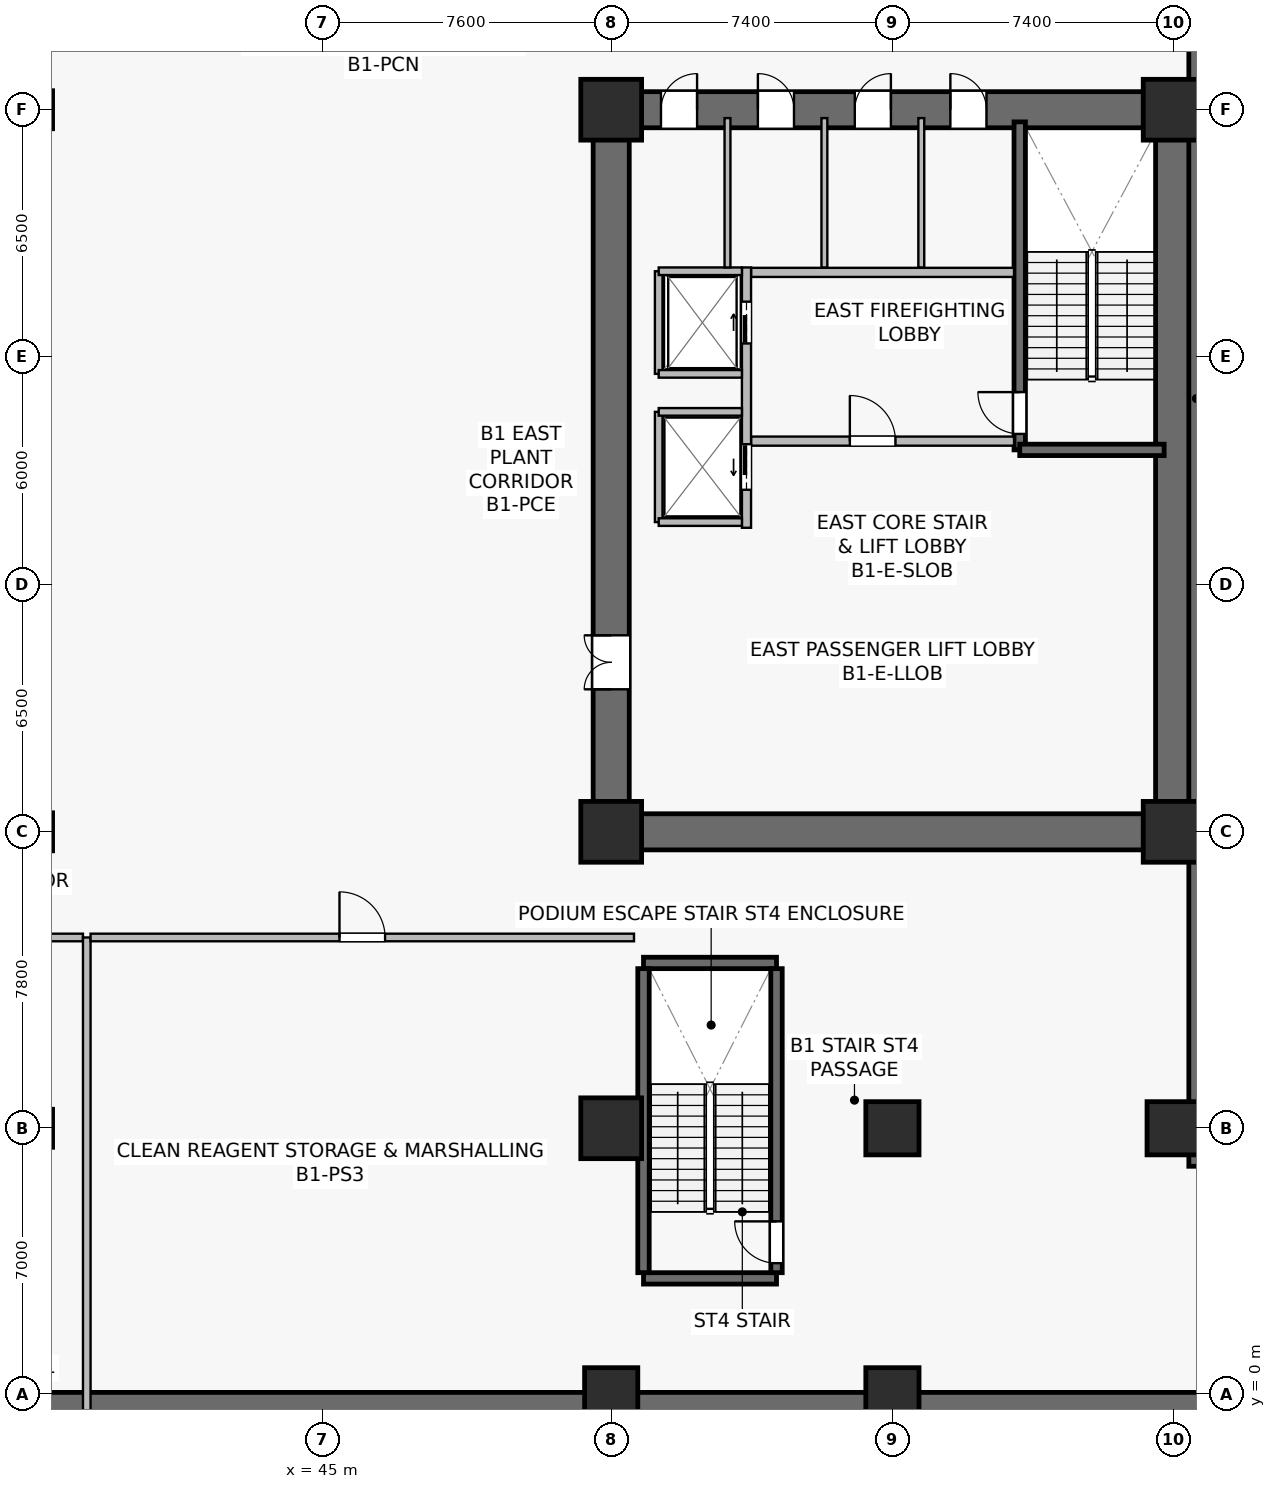
"""IFC4 building model, lengths in metres.
Left out: names, types, materials, properties, quantities, classifications, styles, units other than length and angle.
Written with IfcOpenShell. Run it as: python <this file> out.ifc"""

import sys

from ifc_helpers import new_model, si_unit, direction, frame, frame_2d, origin, origin_2d, place, context, subcontext, project, spatial, rectangle, extrude, source, transform, mapped, element, fill, save


model = new_model("IFC4")
c1 = context("Model", 3, precision=1e-05, world=origin(), true_north=direction((0.0, 1.0)))
c2 = subcontext(c1, "Body", "Model", "MODEL_VIEW")
j1 = project(units=[si_unit("LENGTHUNIT", "METRE"), si_unit("PLANEANGLEUNIT", "RADIAN")], contexts=[c1])
p1 = place(None, origin())
s1 = spatial("IfcSite", under=j1, at=p1, CompositionType="ELEMENT")
p2 = place(p1, origin())
s2 = spatial("IfcBuilding", under=s1, at=p2, CompositionType="ELEMENT")
p3 = place(p2, frame((0.0, 0.0, -4.8)))
s3 = spatial("IfcBuildingStorey", under=s2, at=p3, CompositionType="ELEMENT", Elevation=-4.8)
p4 = place(p3, frame((52.125, 14.8, 0.0), z_axis=(0.0, 0.0, 1.0), x_axis=(1.0, 0.0, 0.0)))
e1 = element("IfcWall", 1, at=p4, inside=s3, PredefinedType="SHEAR", context=c2, shape_type="SweptSolid", body=[
    extrude(rectangle(XDim=15.75, YDim=0.95, at=frame_2d((7.875, 0.0))), origin(), (0.0, 0.0, 1.0), 4.45),
])
p5 = place(p3, frame((52.125, 33.8, 0.0), z_axis=(0.0, 0.0, 1.0), x_axis=(1.0, 0.0, 0.0)))
e2 = element("IfcWall", 2, at=p5, inside=s3, PredefinedType="SHEAR", context=c2, shape_type="SweptSolid", body=[
    extrude(rectangle(XDim=15.75, YDim=0.95, at=frame_2d((7.875, 0.0))), origin(), (0.0, 0.0, 1.0), 4.45),
])
p6 = place(p5, frame((9.4, 0.0, 0.0)))
e3 = element("IfcOpeningElement", 3, at=p6, cuts=e2, PredefinedType="OPENING", context=c2, shape_type="SweptSolid", body=[
    extrude(rectangle(XDim=0.95, YDim=2.15, at=frame_2d((0.475, 1.075))), frame((0.0, 0.485, 0.0), z_axis=(0.0, -1.0, 0.0), x_axis=(1.0, 0.0, 0.0)), (0.0, 0.0, 1.0), 0.97),
])
p7 = place(p5, frame((6.885, 0.0, 0.0)))
e4 = element("IfcOpeningElement", 4, at=p7, cuts=e2, PredefinedType="OPENING", context=c2, shape_type="SweptSolid", body=[
    extrude(rectangle(XDim=0.95, YDim=2.15, at=frame_2d((0.475, 1.075))), frame((0.0, 0.485, 0.0), z_axis=(0.0, -1.0, 0.0), x_axis=(1.0, 0.0, 0.0)), (0.0, 0.0, 1.0), 0.97),
])
p8 = place(p5, frame((4.335, 0.0, 0.0)))
e5 = element("IfcOpeningElement", 5, at=p8, cuts=e2, PredefinedType="OPENING", context=c2, shape_type="SweptSolid", body=[
    extrude(rectangle(XDim=0.95, YDim=2.15, at=frame_2d((0.475, 1.075))), frame((0.0, 0.485, 0.0), z_axis=(0.0, -1.0, 0.0), x_axis=(1.0, 0.0, 0.0)), (0.0, 0.0, 1.0), 0.97),
])
p9 = place(p5, frame((1.785, 0.0, 0.0)))
e6 = element("IfcOpeningElement", 6, at=p9, cuts=e2, PredefinedType="OPENING", context=c2, shape_type="SweptSolid", body=[
    extrude(rectangle(XDim=0.95, YDim=2.15, at=frame_2d((0.475, 1.075))), frame((0.0, 0.485, 0.0), z_axis=(0.0, -1.0, 0.0), x_axis=(1.0, 0.0, 0.0)), (0.0, 0.0, 1.0), 0.97),
])
p10 = place(p3, frame((52.6, 15.275, 0.0), z_axis=(0.0, 0.0, 1.0), x_axis=(0.0, 1.0, 0.0)))
e7 = element("IfcWall", 7, at=p10, inside=s3, PredefinedType="SHEAR", context=c2, shape_type="SweptSolid", body=[
    extrude(rectangle(XDim=18.05, YDim=0.95, at=frame_2d((9.025, 0.0))), origin(), (0.0, 0.0, 1.0), 4.45),
])
p11 = place(p10, frame((3.275, 0.0, 0.0)))
e8 = element("IfcOpeningElement", 8, at=p11, cuts=e7, PredefinedType="OPENING", context=c2, shape_type="SweptSolid", body=[
    extrude(rectangle(XDim=1.42, YDim=2.2, at=frame_2d((0.71, 1.1))), frame((0.0, 0.485, 0.0), z_axis=(0.0, -1.0, 0.0), x_axis=(1.0, 0.0, 0.0)), (0.0, 0.0, 1.0), 0.97),
])
p12 = place(p3, frame((67.4, 15.275, 0.0), z_axis=(0.0, 0.0, 1.0), x_axis=(0.0, 1.0, 0.0)))
e9 = element("IfcWall", 9, at=p12, inside=s3, PredefinedType="SHEAR", context=c2, shape_type="SweptSolid", body=[
    extrude(rectangle(XDim=18.05, YDim=0.95, at=frame_2d((9.025, 0.0))), origin(), (0.0, 0.0, 1.0), 4.45),
])
p13 = place(p3, frame((63.35, 24.85, 0.0), z_axis=(0.0, 0.0, 1.0), x_axis=(0.0, 1.0, 0.0)))
e10 = element("IfcWall", 10, at=p13, inside=s3, PredefinedType="SHEAR", context=c2, shape_type="SweptSolid", body=[
    extrude(rectangle(XDim=8.63, YDim=0.3, at=frame_2d((4.315, 0.0))), origin(), (0.0, 0.0, 1.0), 4.45),
])
p14 = place(p13, frame((0.42, 0.0, 0.0)))
e11 = element("IfcOpeningElement", 11, at=p14, cuts=e10, PredefinedType="OPENING", context=c2, shape_type="SweptSolid", body=[
    extrude(rectangle(XDim=1.1, YDim=2.15, at=frame_2d((0.55, 1.075))), frame((0.0, 0.16, 0.0), z_axis=(0.0, -1.0, 0.0), x_axis=(1.0, 0.0, 0.0)), (0.0, 0.0, 1.0), 0.32),
])
p15 = place(p3, frame((63.35, 24.85, 0.0), z_axis=(0.0, 0.0, 1.0), x_axis=(1.0, 0.0, 0.0)))
e12 = element("IfcWall", 12, at=p15, inside=s3, PredefinedType="SHEAR", context=c2, shape_type="SweptSolid", body=[
    extrude(rectangle(XDim=3.8, YDim=0.3, at=frame_2d((1.9, 0.0))), origin(), (0.0, 0.0, 1.0), 4.45),
])
for number, where, z_axis, x_axis in (
    (13, (53.45, 3.05, 0.0), (0.0, 0.0, 1.0), (1.0, 0.0, 0.0)),
    (14, (53.45, 11.35, 0.0), (0.0, 0.0, 1.0), (1.0, 0.0, 0.0)),
):
    element("IfcWall", number, at=place(p3, frame(where, z_axis=z_axis, x_axis=x_axis)), inside=s3, PredefinedType="SHEAR", context=c2, shape_type="SweptSolid", body=[
        extrude(rectangle(XDim=3.5, YDim=0.3, at=frame_2d((1.75, 0.0))), origin(), (0.0, 0.0, 1.0), 4.45),
    ])
p16 = place(p3, frame((53.45, 3.2, 0.0), z_axis=(0.0, 0.0, 1.0), x_axis=(0.0, 1.0, 0.0)))
e15 = element("IfcWall", 15, at=p16, inside=s3, PredefinedType="SHEAR", context=c2, shape_type="SweptSolid", body=[
    extrude(rectangle(XDim=8.0, YDim=0.3, at=frame_2d((4.0, 0.0))), origin(), (0.0, 0.0, 1.0), 4.45),
])
p17 = place(p3, frame((56.95, 3.2, 0.0), z_axis=(0.0, 0.0, 1.0), x_axis=(0.0, 1.0, 0.0)))
e16 = element("IfcWall", 16, at=p17, inside=s3, PredefinedType="SHEAR", context=c2, shape_type="SweptSolid", body=[
    extrude(rectangle(XDim=8.0, YDim=0.3, at=frame_2d((4.0, 0.0))), origin(), (0.0, 0.0, 1.0), 4.45),
])
p18 = place(p17, frame((0.25, 0.0, 0.0)))
e17 = element("IfcOpeningElement", 17, at=p18, cuts=e16, PredefinedType="OPENING", context=c2, shape_type="SweptSolid", body=[
    extrude(rectangle(XDim=1.1, YDim=2.15, at=frame_2d((0.55, 1.075))), frame((0.0, 0.16, 0.0), z_axis=(0.0, -1.0, 0.0), x_axis=(1.0, 0.0, 0.0)), (0.0, 0.0, 1.0), 0.32),
])
p19 = place(p3, frame((-1.0, -0.375, 0.0), z_axis=(0.0, 0.0, 1.0), x_axis=(1.0, 0.0, 0.0)))
e18 = element("IfcWall", 18, at=p19, inside=s3, PredefinedType="SOLIDWALL", context=c2, shape_type="SweptSolid", body=[
    extrude(rectangle(XDim=76.8, YDim=0.85, at=frame_2d((38.4, 0.0))), origin(), (0.0, 0.0, 1.0), 4.45),
])
p20 = place(p3, frame((68.0, 6.0, 0.0), z_axis=(0.0, 0.0, 1.0), x_axis=(0.0, 1.0, 0.0)))
e19 = element("IfcWall", 19, at=p20, inside=s3, PredefinedType="SHEAR", context=c2, shape_type="SweptSolid", body=[
    extrude(rectangle(XDim=40.4, YDim=0.4, at=frame_2d((20.2, 0.0))), origin(), (0.0, 0.0, 1.0), 4.45),
])
m1 = source(origin(), c2, "Body", "SweptSolid", [
    extrude(rectangle(XDim=1.6, YDim=1.6, at=origin_2d()), origin(), (0.0, 0.0, 1.0), 4.8),
])
p21 = place(p3, frame((52.6, 7.0, 0.0), z_axis=(0.0, 0.0, 1.0), x_axis=(1.0, 0.0, 0.0)))
e20 = element("IfcColumn", 20, at=p21, inside=s3, PredefinedType="COLUMN", context=c2, shape_type="MappedRepresentation", body=[
    mapped(m1, transform((0.0, 0.0, 0.0), scale=1.0)),
])
m2 = source(origin(), c2, "Body", "SweptSolid", [
    extrude(rectangle(XDim=1.4, YDim=1.4, at=origin_2d()), origin(), (0.0, 0.0, 1.0), 4.8),
])
p22 = place(p3, frame((60.0, 7.0, 0.0), z_axis=(0.0, 0.0, 1.0), x_axis=(1.0, 0.0, 0.0)))
e21 = element("IfcColumn", 21, at=p22, inside=s3, PredefinedType="COLUMN", context=c2, shape_type="MappedRepresentation", body=[
    mapped(m2, transform((0.0, 0.0, 0.0), scale=1.0)),
])
for number, where, z_axis, x_axis in (
    (22, (52.6, 14.8, 0.0), (0.0, 0.0, 1.0), (1.0, 0.0, 0.0)),
    (23, (67.4, 14.8, 0.0), (0.0, 0.0, 1.0), (1.0, 0.0, 0.0)),
    (24, (52.6, 33.8, 0.0), (0.0, 0.0, 1.0), (1.0, 0.0, 0.0)),
    (25, (67.4, 33.8, 0.0), (0.0, 0.0, 1.0), (1.0, 0.0, 0.0)),
):
    element("IfcColumn", number, at=place(p3, frame(where, z_axis=z_axis, x_axis=x_axis)), inside=s3, PredefinedType="COLUMN", context=c2, shape_type="MappedRepresentation", body=[
        mapped(m1, transform((0.0, 0.0, 0.0), scale=1.0)),
    ])
for number, where, z_axis, x_axis in (
    (26, (67.4, 7.0, 0.0), (0.0, 0.0, 1.0), (1.0, 0.0, 0.0)),
    (27, (52.6, 0.0, 0.0), (0.0, 0.0, 1.0), (1.0, 0.0, 0.0)),
    (28, (60.0, 0.0, 0.0), (0.0, 0.0, 1.0), (1.0, 0.0, 0.0)),
):
    element("IfcColumn", number, at=place(p3, frame(where, z_axis=z_axis, x_axis=x_axis)), inside=s3, PredefinedType="COLUMN", context=c2, shape_type="MappedRepresentation", body=[
        mapped(m2, transform((0.0, 0.0, 0.0), scale=1.0)),
    ])
p23 = place(p3, frame((56.28, 25.08, 0.0), z_axis=(0.0, 0.0, 1.0), x_axis=(1.0, 0.0, 0.0)))
e29 = element("IfcWall", 29, at=p23, inside=s3, PredefinedType="SOLIDWALL", context=c2, shape_type="SweptSolid", body=[
    extrude(rectangle(XDim=6.92, YDim=0.24, at=frame_2d((3.46, 0.0))), origin(), (0.0, 0.0, 1.0), 3.685),
])
p24 = place(p23, frame((2.6, 0.0, 0.0)))
e30 = element("IfcOpeningElement", 30, at=p24, cuts=e29, PredefinedType="OPENING", context=c2, shape_type="SweptSolid", body=[
    extrude(rectangle(XDim=1.2, YDim=2.16, at=frame_2d((0.6, 1.08))), frame((0.0, 0.13, 0.0), z_axis=(0.0, -1.0, 0.0), x_axis=(1.0, 0.0, 0.0)), (0.0, 0.0, 1.0), 0.26),
])
p25 = place(p3, frame((56.28, 29.52, 0.0), z_axis=(0.0, 0.0, 1.0), x_axis=(1.0, 0.0, 0.0)))
e31 = element("IfcWall", 31, at=p25, inside=s3, PredefinedType="SOLIDWALL", context=c2, shape_type="SweptSolid", body=[
    extrude(rectangle(XDim=6.92, YDim=0.24, at=frame_2d((3.46, 0.0))), origin(), (0.0, 0.0, 1.0), 3.685),
])
p26 = place(p3, frame((56.16, 22.8, 0.0), z_axis=(0.0, 0.0, 1.0), x_axis=(0.0, 1.0, 0.0)))
e32 = element("IfcWall", 32, at=p26, inside=s3, PredefinedType="SOLIDWALL", context=c2, shape_type="SweptSolid", body=[
    extrude(rectangle(XDim=6.85, YDim=0.24, at=frame_2d((3.425, 0.0))), origin(), (0.0, 0.0, 1.0), 3.535),
])
p27 = place(p26, frame((4.85, 0.0, 0.0)))
e33 = element("IfcOpeningElement", 33, at=p27, cuts=e32, PredefinedType="OPENING", context=c2, shape_type="SweptSolid", body=[
    extrude(rectangle(XDim=1.1, YDim=2.22, at=frame_2d((0.55, 1.11))), frame((0.0, 0.13, 0.0), z_axis=(0.0, -1.0, 0.0), x_axis=(1.0, 0.0, 0.0)), (0.0, 0.0, 1.0), 0.26),
])
p28 = place(p26, frame((1.0, 0.0, 0.0)))
e34 = element("IfcOpeningElement", 34, at=p28, cuts=e32, PredefinedType="OPENING", context=c2, shape_type="SweptSolid", body=[
    extrude(rectangle(XDim=1.2, YDim=2.22, at=frame_2d((0.6, 1.11))), frame((0.0, 0.13, 0.0), z_axis=(0.0, -1.0, 0.0), x_axis=(1.0, 0.0, 0.0)), (0.0, 0.0, 1.0), 0.26),
])
p29 = place(p3, frame((53.85, 26.85, 0.0), z_axis=(0.0, 0.0, 1.0), x_axis=(0.0, 1.0, 0.0)))
e35 = element("IfcWall", 35, at=p29, inside=s3, PredefinedType="SOLIDWALL", context=c2, shape_type="SweptSolid", body=[
    extrude(rectangle(XDim=2.7, YDim=0.2, at=frame_2d((1.35, 0.0))), origin(), (0.0, 0.0, 1.0), 4.45),
])
p30 = place(p3, frame((53.85, 29.55, 0.0), z_axis=(0.0, 0.0, 1.0), x_axis=(1.0, 0.0, 0.0)))
e36 = element("IfcWall", 36, at=p30, inside=s3, PredefinedType="SOLIDWALL", context=c2, shape_type="SweptSolid", body=[
    extrude(rectangle(XDim=2.19, YDim=0.2, at=frame_2d((1.095, 0.0))), origin(), (0.0, 0.0, 1.0), 4.45),
])
p31 = place(p3, frame((53.85, 26.85, 0.0), z_axis=(0.0, 0.0, 1.0), x_axis=(1.0, 0.0, 0.0)))
e37 = element("IfcWall", 37, at=p31, inside=s3, PredefinedType="SOLIDWALL", context=c2, shape_type="SweptSolid", body=[
    extrude(rectangle(XDim=2.19, YDim=0.2, at=frame_2d((1.095, 0.0))), origin(), (0.0, 0.0, 1.0), 3.847),
])
p32 = place(p3, frame((53.85, 22.95, 0.0), z_axis=(0.0, 0.0, 1.0), x_axis=(0.0, 1.0, 0.0)))
e38 = element("IfcWall", 38, at=p32, inside=s3, PredefinedType="SOLIDWALL", context=c2, shape_type="SweptSolid", body=[
    extrude(rectangle(XDim=2.9, YDim=0.2, at=frame_2d((1.45, 0.0))), origin(), (0.0, 0.0, 1.0), 3.535),
])
for number, where, z_axis, x_axis in (
    (39, (53.85, 25.85, 0.0), (0.0, 0.0, 1.0), (1.0, 0.0, 0.0)),
    (40, (53.85, 22.95, 0.0), (0.0, 0.0, 1.0), (1.0, 0.0, 0.0)),
):
    element("IfcWall", number, at=place(p3, frame(where, z_axis=z_axis, x_axis=x_axis)), inside=s3, PredefinedType="SOLIDWALL", context=c2, shape_type="SweptSolid", body=[
        extrude(rectangle(XDim=2.19, YDim=0.2, at=frame_2d((1.095, 0.0))), origin(), (0.0, 0.0, 1.0), 4.45),
    ])
for number, where, z_axis, x_axis in (
    (41, (60.76, 29.65, 0.0), (0.0, 0.0, 1.0), (0.0, 1.0, 0.0)),
    (42, (58.21, 29.65, 0.0), (0.0, 0.0, 1.0), (0.0, 1.0, 0.0)),
    (43, (55.66, 29.65, 0.0), (0.0, 0.0, 1.0), (0.0, 1.0, 0.0)),
):
    element("IfcWall", number, at=place(p3, frame(where, z_axis=z_axis, x_axis=x_axis)), inside=s3, PredefinedType="PLUMBINGWALL", context=c2, shape_type="SweptSolid", body=[
        extrude(rectangle(XDim=3.93, YDim=0.155, at=frame_2d((1.965, 0.0))), origin(), (0.0, 0.0, 1.0), 4.45),
    ])
p33 = place(p3, frame((19.3, 12.02, 0.0), z_axis=(0.0, 0.0, 1.0), x_axis=(1.0, 0.0, 0.0)))
e44 = element("IfcWall", 44, at=p33, inside=s3, PredefinedType="SOLIDWALL", context=c2, shape_type="SweptSolid", body=[
    extrude(rectangle(XDim=19.4, YDim=0.2, at=frame_2d((9.7, 0.0))), origin(), (0.0, 0.0, 1.0), 3.685),
])
p34 = place(p33, frame((9.1, 0.0, 0.0)))
e45 = element("IfcOpeningElement", 45, at=p34, cuts=e44, PredefinedType="OPENING", context=c2, shape_type="SweptSolid", body=[
    extrude(rectangle(XDim=1.2, YDim=2.16, at=frame_2d((0.6, 1.08))), frame((0.0, 0.11, 0.0), z_axis=(0.0, -1.0, 0.0), x_axis=(1.0, 0.0, 0.0)), (0.0, 0.0, 1.0), 0.22),
])
p35 = place(p3, frame((38.8, -0.69, 0.0), z_axis=(0.0, 0.0, 1.0), x_axis=(0.0, 1.0, 0.0)))
e46 = element("IfcWall", 46, at=p35, inside=s3, PredefinedType="SOLIDWALL", context=c2, shape_type="SweptSolid", body=[
    extrude(rectangle(XDim=12.71, YDim=0.2, at=frame_2d((6.355, 0.0))), origin(), (0.0, 0.0, 1.0), 3.635),
])
p36 = place(p3, frame((38.9, 12.02, 0.0), z_axis=(0.0, 0.0, 1.0), x_axis=(1.0, 0.0, 0.0)))
e47 = element("IfcWall", 47, at=p36, inside=s3, PredefinedType="SOLIDWALL", context=c2, shape_type="SweptSolid", body=[
    extrude(rectangle(XDim=14.3, YDim=0.2, at=frame_2d((7.15, 0.0))), origin(), (0.0, 0.0, 1.0), 3.685),
])
p37 = place(p36, frame((6.55, 0.0, 0.0)))
e48 = element("IfcOpeningElement", 48, at=p37, cuts=e47, PredefinedType="OPENING", context=c2, shape_type="SweptSolid", body=[
    extrude(rectangle(XDim=1.2, YDim=2.16, at=frame_2d((0.6, 1.08))), frame((0.0, 0.11, 0.0), z_axis=(0.0, -1.0, 0.0), x_axis=(1.0, 0.0, 0.0)), (0.0, 0.0, 1.0), 0.22),
])
m3 = source(origin(), c2, "Body", "SweptSolid", [
    extrude(rectangle(XDim=1.1, YDim=2.15, at=frame_2d((0.55, 1.075))), frame((0.0, 0.025, 0.0), z_axis=(0.0, -1.0, 0.0), x_axis=(1.0, 0.0, 0.0)), (0.0, 0.0, 1.0), 0.05),
])
p38 = place(p14, origin())
e49 = element("IfcDoor", 49, at=p38, inside=s3, OperationType="SINGLE_SWING_RIGHT", PredefinedType="DOOR", context=c2, shape_type="MappedRepresentation", body=[
    mapped(m3, transform((0.0, 0.0, 0.0), scale=1.0)),
])
fill(e11, e49)
m4 = source(origin(), c2, "Body", "SweptSolid", [
    extrude(rectangle(XDim=1.2, YDim=2.16, at=frame_2d((0.6, 1.08))), frame((0.0, 0.025, 0.0), z_axis=(0.0, -1.0, 0.0), x_axis=(1.0, 0.0, 0.0)), (0.0, 0.0, 1.0), 0.05),
])
p39 = place(p24, origin())
e50 = element("IfcDoor", 50, at=p39, inside=s3, OperationType="SINGLE_SWING_LEFT", PredefinedType="DOOR", context=c2, shape_type="MappedRepresentation", body=[
    mapped(m4, transform((0.0, 0.0, 0.0), scale=1.0)),
])
fill(e30, e50)
m5 = source(origin(), c2, "Body", "SweptSolid", [
    extrude(rectangle(XDim=1.1, YDim=2.22, at=frame_2d((0.55, 1.11))), frame((0.0, 0.025, 0.0), z_axis=(0.0, -1.0, 0.0), x_axis=(1.0, 0.0, 0.0)), (0.0, 0.0, 1.0), 0.05),
])
p40 = place(p27, origin())
e51 = element("IfcDoor", 51, at=p40, inside=s3, OperationType="SLIDING_TO_RIGHT", PredefinedType="USERDEFINED", context=c2, shape_type="MappedRepresentation", body=[
    mapped(m5, transform((0.0, 0.0, 0.0), scale=1.0)),
])
fill(e33, e51)
m6 = source(origin(), c2, "Body", "SweptSolid", [
    extrude(rectangle(XDim=1.2, YDim=2.22, at=frame_2d((0.6, 1.11))), frame((0.0, 0.025, 0.0), z_axis=(0.0, -1.0, 0.0), x_axis=(1.0, 0.0, 0.0)), (0.0, 0.0, 1.0), 0.05),
])
p41 = place(p28, origin())
e52 = element("IfcDoor", 52, at=p41, inside=s3, OperationType="SLIDING_TO_LEFT", PredefinedType="USERDEFINED", context=c2, shape_type="MappedRepresentation", body=[
    mapped(m6, transform((0.0, 0.0, 0.0), scale=1.0)),
])
fill(e34, e52)
m7 = source(origin(), c2, "Body", "SweptSolid", [
    extrude(rectangle(XDim=1.42, YDim=2.2, at=frame_2d((0.71, 1.1))), frame((0.0, 0.025, 0.0), z_axis=(0.0, -1.0, 0.0), x_axis=(1.0, 0.0, 0.0)), (0.0, 0.0, 1.0), 0.05),
])
p42 = place(p11, origin())
e53 = element("IfcDoor", 53, at=p42, inside=s3, OperationType="DOUBLE_DOOR_SINGLE_SWING", PredefinedType="DOOR", context=c2, shape_type="MappedRepresentation", body=[
    mapped(m7, transform((0.0, 0.0, 0.0), scale=1.0)),
])
fill(e8, e53)
m8 = source(origin(), c2, "Body", "SweptSolid", [
    extrude(rectangle(XDim=0.95, YDim=2.15, at=frame_2d((0.475, 1.075))), frame((0.0, 0.025, 0.0), z_axis=(0.0, -1.0, 0.0), x_axis=(1.0, 0.0, 0.0)), (0.0, 0.0, 1.0), 0.05),
])
p43 = place(p6, origin())
e54 = element("IfcDoor", 54, at=p43, inside=s3, OperationType="SINGLE_SWING_LEFT", PredefinedType="DOOR", context=c2, shape_type="MappedRepresentation", body=[
    mapped(m8, transform((0.0, 0.0, 0.0), scale=1.0)),
])
fill(e3, e54)
p44 = place(p7, origin())
e55 = element("IfcDoor", 55, at=p44, inside=s3, OperationType="SINGLE_SWING_RIGHT", PredefinedType="DOOR", context=c2, shape_type="MappedRepresentation", body=[
    mapped(m8, transform((0.0, 0.0, 0.0), scale=1.0)),
])
fill(e4, e55)
p45 = place(p8, origin())
e56 = element("IfcDoor", 56, at=p45, inside=s3, OperationType="SINGLE_SWING_LEFT", PredefinedType="DOOR", context=c2, shape_type="MappedRepresentation", body=[
    mapped(m8, transform((0.0, 0.0, 0.0), scale=1.0)),
])
fill(e5, e56)
p46 = place(p9, origin())
e57 = element("IfcDoor", 57, at=p46, inside=s3, OperationType="SINGLE_SWING_RIGHT", PredefinedType="DOOR", context=c2, shape_type="MappedRepresentation", body=[
    mapped(m8, transform((0.0, 0.0, 0.0), scale=1.0)),
])
fill(e6, e57)
p47 = place(p18, origin())
e58 = element("IfcDoor", 58, at=p47, inside=s3, OperationType="SINGLE_SWING_RIGHT", PredefinedType="DOOR", context=c2, shape_type="MappedRepresentation", body=[
    mapped(m3, transform((0.0, 0.0, 0.0), scale=1.0)),
])
fill(e17, e58)
p48 = place(p37, origin())
e59 = element("IfcDoor", 59, at=p48, inside=s3, OperationType="SINGLE_SWING_LEFT", PredefinedType="DOOR", context=c2, shape_type="MappedRepresentation", body=[
    mapped(m4, transform((0.0, 0.0, 0.0), scale=1.0)),
])
fill(e48, e59)
save(model, sys.argv[1])
